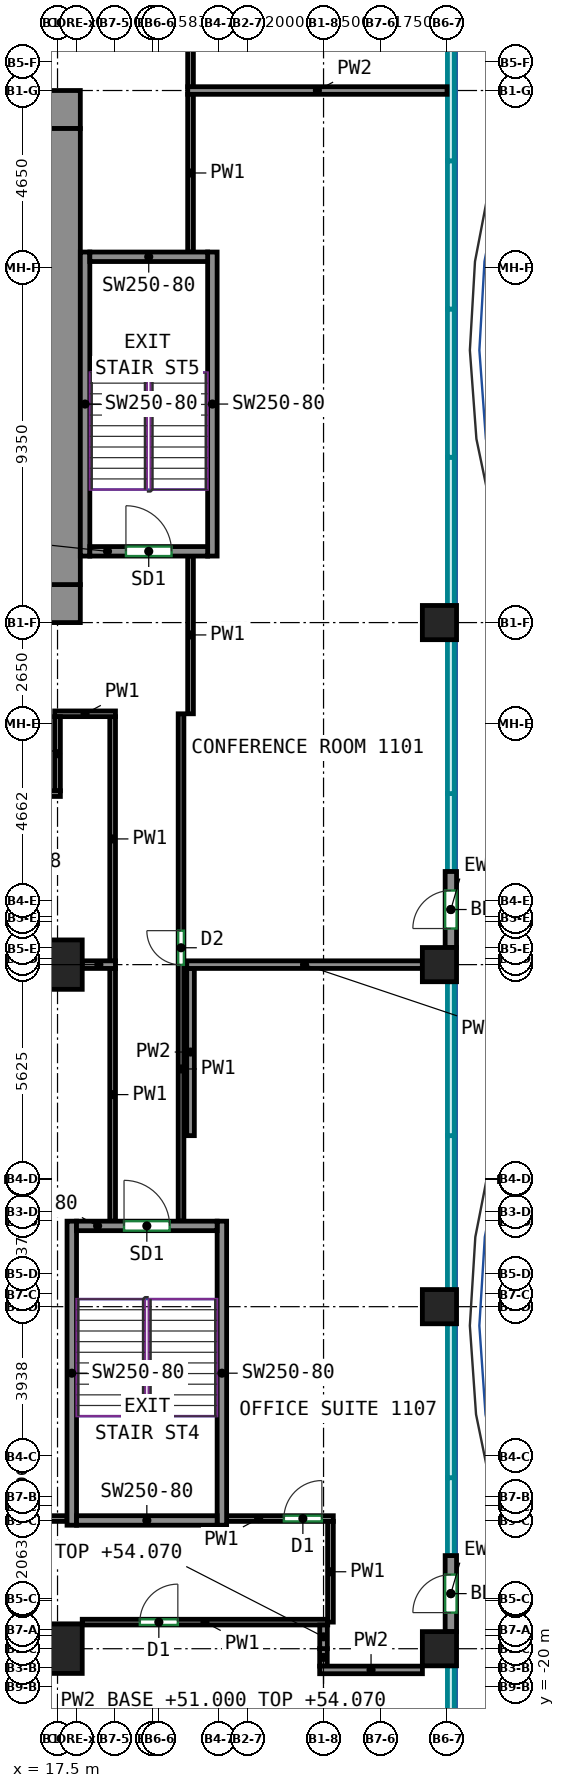
"""IFC4 building model, lengths in metres.
Left out: names, types, materials, properties, quantities, classifications, styles, units other than length and angle.
Written with IfcOpenShell. Run it as: python <this file> out.ifc"""

import sys

from ifc_helpers import new_model, si_unit, direction, frame, frame_2d, origin, origin_2d, place, context, subcontext, project, spatial, rectangle, extrude, source, transform, mapped, element, fill, save


model = new_model("IFC4")
c1 = context("Model", 3, precision=1e-05, world=origin(), true_north=direction((0.0, 1.0)))
c2 = subcontext(c1, "Body", "Model", "MODEL_VIEW")
j1 = project(units=[si_unit("LENGTHUNIT", "METRE"), si_unit("PLANEANGLEUNIT", "RADIAN")], contexts=[c1])
p1 = place(None, origin())
s1 = spatial("IfcSite", under=j1, at=p1, CompositionType="ELEMENT")
p2 = place(p1, origin())
s2 = spatial("IfcBuilding", under=s1, at=p2, CompositionType="ELEMENT")
p3 = place(p2, frame((0.0, 0.0, 51.0)))
s3 = spatial("IfcBuildingStorey", under=s2, at=p3, CompositionType="ELEMENT", Elevation=51.0)
m1 = source(origin(), c2, "Body", "SweptSolid", [
    extrude(rectangle(XDim=1.3, YDim=1.3, at=origin_2d()), origin(), (0.0, 0.0, 1.0), 3.72),
])
for number, where, z_axis, x_axis in (
    (1, (17.5, -19.0, 0.0), (0.0, 0.0, 1.0), (1.0, 0.0, 0.0)),
    (2, (17.5, -1.0, 0.0), (0.0, 0.0, 1.0), (1.0, 0.0, 0.0)),
):
    element("IfcColumn", number, at=place(p3, frame(where, z_axis=z_axis, x_axis=x_axis)), inside=s3, PredefinedType="COLUMN", context=c2, shape_type="MappedRepresentation", body=[
        mapped(m1, transform((0.0, 0.0, 0.0))),
    ])
m2 = source(origin(), c2, "Body", "SweptSolid", [
    extrude(rectangle(XDim=0.9, YDim=0.9, at=origin_2d()), origin(), (0.0, 0.0, 1.0), 3.72),
])
for number, where, z_axis, x_axis in (
    (3, (27.55, -19.0, 0.0), (0.0, 0.0, 1.0), (1.0, 0.0, 0.0)),
    (4, (27.55, -10.0, 0.0), (0.0, 0.0, 1.0), (1.0, 0.0, 0.0)),
    (5, (27.55, -1.0, 0.0), (0.0, 0.0, 1.0), (1.0, 0.0, 0.0)),
    (6, (27.55, 8.0, 0.0), (0.0, 0.0, 1.0), (1.0, 0.0, 0.0)),
):
    element("IfcColumn", number, at=place(p3, frame(where, z_axis=z_axis, x_axis=x_axis)), inside=s3, PredefinedType="COLUMN", context=c2, shape_type="MappedRepresentation", body=[
        mapped(m2, transform((0.0, 0.0, 0.0))),
    ])
m3 = source(origin(), c2, "Body", "SweptSolid", [
    extrude(rectangle(XDim=5.63, YDim=1.0, at=frame_2d((2.815, 0.0))), origin(), (0.0, 0.0, 1.0), 3.72),
])
p4 = place(p3, frame((12.47, 8.5, 0.0), z_axis=(0.0, 0.0, 1.0), x_axis=(1.0, 0.0, 0.0)))
e7 = element("IfcWall", 7, at=p4, inside=s3, PredefinedType="SHEAR", context=c2, shape_type="MappedRepresentation", body=[
    mapped(m3, transform((0.0, 0.0, 0.0))),
])
p5 = place(p4, frame((2.18, 0.0, 0.0)))
e8 = element("IfcOpeningElement", 8, at=p5, cuts=e7, PredefinedType="OPENING", context=c2, shape_type="SweptSolid", body=[
    extrude(rectangle(XDim=1.2, YDim=2.1, at=frame_2d((0.6, 1.05))), frame((0.0, 0.51, 0.0), z_axis=(0.0, -1.0, 0.0), x_axis=(1.0, 0.0, 0.0)), (0.0, 0.0, 1.0), 1.02),
])
m4 = source(origin(), c2, "Body", "SweptSolid", [
    extrude(rectangle(XDim=34.1, YDim=1.0, at=frame_2d((17.05, 0.0))), origin(), (0.0, 0.0, 1.0), 3.72),
])
p6 = place(p3, frame((-16.0, 21.5, 0.0), z_axis=(0.0, 0.0, 1.0), x_axis=(1.0, 0.0, 0.0)))
e9 = element("IfcWall", 9, at=p6, inside=s3, PredefinedType="SHEAR", context=c2, shape_type="MappedRepresentation", body=[
    mapped(m4, transform((0.0, 0.0, 0.0))),
])
p7 = place(p6, frame((6.108, 0.0, 0.0)))
e10 = element("IfcOpeningElement", 10, at=p7, cuts=e9, PredefinedType="OPENING", context=c2, shape_type="SweptSolid", body=[
    extrude(rectangle(XDim=0.9, YDim=2.1, at=frame_2d((0.45, 1.05))), frame((0.0, 0.51, 0.0), z_axis=(0.0, -1.0, 0.0), x_axis=(1.0, 0.0, 0.0)), (0.0, 0.0, 1.0), 1.02),
])
p8 = place(p6, frame((11.173, 0.0, 0.0)))
e11 = element("IfcOpeningElement", 11, at=p8, cuts=e9, PredefinedType="OPENING", context=c2, shape_type="SweptSolid", body=[
    extrude(rectangle(XDim=0.9, YDim=2.1, at=frame_2d((0.45, 1.05))), frame((0.0, 0.51, 0.0), z_axis=(0.0, -1.0, 0.0), x_axis=(1.0, 0.0, 0.0)), (0.0, 0.0, 1.0), 1.02),
])
p9 = place(p6, frame((16.238, 0.0, 0.0)))
e12 = element("IfcOpeningElement", 12, at=p9, cuts=e9, PredefinedType="OPENING", context=c2, shape_type="SweptSolid", body=[
    extrude(rectangle(XDim=0.9, YDim=2.1, at=frame_2d((0.45, 1.05))), frame((0.0, 0.51, 0.0), z_axis=(0.0, -1.0, 0.0), x_axis=(1.0, 0.0, 0.0)), (0.0, 0.0, 1.0), 1.02),
])
p10 = place(p6, frame((21.062, 0.0, 0.0)))
e13 = element("IfcOpeningElement", 13, at=p10, cuts=e9, PredefinedType="OPENING", context=c2, shape_type="SweptSolid", body=[
    extrude(rectangle(XDim=0.9, YDim=2.1, at=frame_2d((0.45, 1.05))), frame((0.0, 0.51, 0.0), z_axis=(0.0, -1.0, 0.0), x_axis=(1.0, 0.0, 0.0)), (0.0, 0.0, 1.0), 1.02),
])
p11 = place(p6, frame((26.489, 0.0, 0.0)))
e14 = element("IfcOpeningElement", 14, at=p11, cuts=e9, PredefinedType="OPENING", context=c2, shape_type="SweptSolid", body=[
    extrude(rectangle(XDim=0.9, YDim=2.1, at=frame_2d((0.45, 1.05))), frame((0.0, 0.51, 0.0), z_axis=(0.0, -1.0, 0.0), x_axis=(1.0, 0.0, 0.0)), (0.0, 0.0, 1.0), 1.02),
])
p12 = place(p6, frame((2.525, 0.0, 0.0)))
e15 = element("IfcOpeningElement", 15, at=p12, cuts=e9, PredefinedType="OPENING", context=c2, shape_type="SweptSolid", body=[
    extrude(rectangle(XDim=0.9, YDim=2.1, at=frame_2d((0.45, 1.05))), frame((0.0, 0.51, 0.0), z_axis=(0.0, -1.0, 0.0), x_axis=(1.0, 0.0, 0.0)), (0.0, 0.0, 1.0), 1.02),
])
p13 = place(p6, frame((30.675, 0.0, 0.0)))
e16 = element("IfcOpeningElement", 16, at=p13, cuts=e9, PredefinedType="OPENING", context=c2, shape_type="SweptSolid", body=[
    extrude(rectangle(XDim=0.9, YDim=2.1, at=frame_2d((0.45, 1.05))), frame((0.0, 0.51, 0.0), z_axis=(0.0, -1.0, 0.0), x_axis=(1.0, 0.0, 0.0)), (0.0, 0.0, 1.0), 1.02),
])
m5 = source(origin(), c2, "Body", "SweptSolid", [
    extrude(rectangle(XDim=12.0, YDim=1.0, at=frame_2d((6.0, 0.0))), origin(), (0.0, 0.0, 1.0), 3.72),
])
p14 = place(p3, frame((17.6, 9.0, 0.0), z_axis=(0.0, 0.0, 1.0), x_axis=(0.0, 1.0, 0.0)))
e17 = element("IfcWall", 17, at=p14, inside=s3, PredefinedType="SHEAR", context=c2, shape_type="MappedRepresentation", body=[
    mapped(m5, transform((0.0, 0.0, 0.0))),
])
m6 = source(origin(), c2, "Body", "SweptSolid", [
    extrude(rectangle(XDim=8.0, YDim=0.25, at=frame_2d((4.0, 0.0))), origin(), (0.0, 0.0, 1.0), 3.72),
])
for number, where, z_axis, x_axis in (
    (18, (17.875, -15.75, 0.0), (0.0, 0.0, 1.0), (0.0, 1.0, 0.0)),
    (19, (21.825, -15.75, 0.0), (0.0, 0.0, 1.0), (0.0, 1.0, 0.0)),
):
    element("IfcWall", number, at=place(p3, frame(where, z_axis=z_axis, x_axis=x_axis)), inside=s3, PredefinedType="SHEAR", context=c2, shape_type="MappedRepresentation", body=[
        mapped(m6, transform((0.0, 0.0, 0.0))),
    ])
m7 = source(origin(), c2, "Body", "SweptSolid", [
    extrude(rectangle(XDim=3.7, YDim=0.25, at=frame_2d((1.85, 0.0))), origin(), (0.0, 0.0, 1.0), 3.72),
])
p15 = place(p3, frame((18.0, -15.625, 0.0), z_axis=(0.0, 0.0, 1.0), x_axis=(1.0, 0.0, 0.0)))
e20 = element("IfcWall", 20, at=p15, inside=s3, PredefinedType="SHEAR", context=c2, shape_type="MappedRepresentation", body=[
    mapped(m7, transform((0.0, 0.0, 0.0))),
])
p16 = place(p3, frame((18.0, -7.875, 0.0), z_axis=(0.0, 0.0, 1.0), x_axis=(1.0, 0.0, 0.0)))
e21 = element("IfcWall", 21, at=p16, inside=s3, PredefinedType="SHEAR", context=c2, shape_type="MappedRepresentation", body=[
    mapped(m7, transform((0.0, 0.0, 0.0))),
])
p17 = place(p16, frame((1.25, 0.0, 0.0)))
e22 = element("IfcOpeningElement", 22, at=p17, cuts=e21, PredefinedType="OPENING", context=c2, shape_type="SweptSolid", body=[
    extrude(rectangle(XDim=1.2, YDim=2.1, at=frame_2d((0.6, 1.05))), frame((0.0, 0.135, 0.0), z_axis=(0.0, -1.0, 0.0), x_axis=(1.0, 0.0, 0.0)), (0.0, 0.0, 1.0), 0.27),
])
for number, where, z_axis, x_axis in (
    (23, (18.225, 9.75, 0.0), (0.0, 0.0, 1.0), (0.0, 1.0, 0.0)),
    (24, (21.575, 9.75, 0.0), (0.0, 0.0, 1.0), (0.0, 1.0, 0.0)),
):
    element("IfcWall", number, at=place(p3, frame(where, z_axis=z_axis, x_axis=x_axis)), inside=s3, PredefinedType="SHEAR", context=c2, shape_type="MappedRepresentation", body=[
        mapped(m6, transform((0.0, 0.0, 0.0))),
    ])
m8 = source(origin(), c2, "Body", "SweptSolid", [
    extrude(rectangle(XDim=3.1, YDim=0.25, at=frame_2d((1.55, 0.0))), origin(), (0.0, 0.0, 1.0), 3.72),
])
p18 = place(p3, frame((18.35, 9.875, 0.0), z_axis=(0.0, 0.0, 1.0), x_axis=(1.0, 0.0, 0.0)))
e25 = element("IfcWall", 25, at=p18, inside=s3, PredefinedType="SHEAR", context=c2, shape_type="MappedRepresentation", body=[
    mapped(m8, transform((0.0, 0.0, 0.0))),
])
p19 = place(p18, frame((0.95, 0.0, 0.0)))
e26 = element("IfcOpeningElement", 26, at=p19, cuts=e25, PredefinedType="OPENING", context=c2, shape_type="SweptSolid", body=[
    extrude(rectangle(XDim=1.2, YDim=2.1, at=frame_2d((0.6, 1.05))), frame((0.0, 0.135, 0.0), z_axis=(0.0, -1.0, 0.0), x_axis=(1.0, 0.0, 0.0)), (0.0, 0.0, 1.0), 0.27),
])
p20 = place(p3, frame((18.35, 17.625, 0.0), z_axis=(0.0, 0.0, 1.0), x_axis=(1.0, 0.0, 0.0)))
e27 = element("IfcWall", 27, at=p20, inside=s3, PredefinedType="SHEAR", context=c2, shape_type="MappedRepresentation", body=[
    mapped(m8, transform((0.0, 0.0, 0.0))),
])
m9 = source(origin(), c2, "Body", "SweptSolid", [
    extrude(rectangle(XDim=2.0, YDim=0.3, at=frame_2d((1.0, 0.0))), origin(), (0.0, 0.0, 1.0), 3.72),
])
p21 = place(p3, frame((27.85, -18.55, 0.0), z_axis=(0.0, 0.0, 1.0), x_axis=(0.0, 1.0, 0.0)))
e28 = element("IfcWall", 28, at=p21, inside=s3, PredefinedType="SOLIDWALL", context=c2, shape_type="MappedRepresentation", body=[
    mapped(m9, transform((0.0, 0.0, 0.0))),
])
p22 = place(p21, frame((0.5, 0.0, 0.0)))
e29 = element("IfcOpeningElement", 29, at=p22, cuts=e28, PredefinedType="OPENING", context=c2, shape_type="SweptSolid", body=[
    extrude(rectangle(XDim=1.0, YDim=2.1, at=frame_2d((0.5, 1.05))), frame((0.0, 0.16, 0.0), z_axis=(0.0, -1.0, 0.0), x_axis=(1.0, 0.0, 0.0)), (0.0, 0.0, 1.0), 0.32),
])
p23 = place(p3, frame((27.85, -0.55, 0.0), z_axis=(0.0, 0.0, 1.0), x_axis=(0.0, 1.0, 0.0)))
e30 = element("IfcWall", 30, at=p23, inside=s3, PredefinedType="SOLIDWALL", context=c2, shape_type="MappedRepresentation", body=[
    mapped(m9, transform((0.0, 0.0, 0.0))),
])
p24 = place(p23, frame((0.5, 0.0, 0.0)))
e31 = element("IfcOpeningElement", 31, at=p24, cuts=e30, PredefinedType="OPENING", context=c2, shape_type="SweptSolid", body=[
    extrude(rectangle(XDim=1.0, YDim=2.1, at=frame_2d((0.5, 1.05))), frame((0.0, 0.16, 0.0), z_axis=(0.0, -1.0, 0.0), x_axis=(1.0, 0.0, 0.0)), (0.0, 0.0, 1.0), 0.32),
])
p25 = place(p3, frame((18.15, -18.3, 0.0), z_axis=(0.0, 0.0, 1.0), x_axis=(1.0, 0.0, 0.0)))
e32 = element("IfcWall", 32, at=p25, inside=s3, PredefinedType="PARTITIONING", context=c2, shape_type="SweptSolid", body=[
    extrude(rectangle(XDim=6.46, YDim=0.15, at=frame_2d((3.23, 0.0))), origin(), (0.0, 0.0, 1.0), 3.72),
])
p26 = place(p25, frame((1.516, 0.0, 0.0)))
e33 = element("IfcOpeningElement", 33, at=p26, cuts=e32, PredefinedType="OPENING", context=c2, shape_type="SweptSolid", body=[
    extrude(rectangle(XDim=1.0, YDim=2.1, at=frame_2d((0.5, 1.05))), frame((0.0, 0.085, 0.0), z_axis=(0.0, -1.0, 0.0), x_axis=(1.0, 0.0, 0.0)), (0.0, 0.0, 1.0), 0.17),
])
p27 = place(p3, frame((10.825, -15.575, 0.0), z_axis=(0.0, 0.0, 1.0), x_axis=(1.0, 0.0, 0.0)))
e34 = element("IfcWall", 34, at=p27, inside=s3, PredefinedType="PARTITIONING", context=c2, shape_type="SweptSolid", body=[
    extrude(rectangle(XDim=6.925, YDim=0.15, at=frame_2d((3.462, 0.0))), origin(), (0.0, 0.0, 1.0), 3.72),
])
p28 = place(p3, frame((18.95, -7.75, 0.0), z_axis=(0.0, 0.0, 1.0), x_axis=(0.0, 1.0, 0.0)))
e35 = element("IfcWall", 35, at=p28, inside=s3, PredefinedType="PARTITIONING", context=c2, shape_type="SweptSolid", body=[
    extrude(rectangle(XDim=6.66, YDim=0.15, at=frame_2d((3.33, 0.0))), origin(), (0.0, 0.0, 1.0), 3.72),
])
p29 = place(p3, frame((21.95, -15.575, 0.0), z_axis=(0.0, 0.0, 1.0), x_axis=(1.0, 0.0, 0.0)))
e36 = element("IfcWall", 36, at=p29, inside=s3, PredefinedType="PARTITIONING", context=c2, shape_type="SweptSolid", body=[
    extrude(rectangle(XDim=2.807, YDim=0.15, at=frame_2d((1.404, 0.0))), origin(), (0.0, 0.0, 1.0), 3.72),
])
p30 = place(p29, frame((1.506, 0.0, 0.0)))
e37 = element("IfcOpeningElement", 37, at=p30, cuts=e36, PredefinedType="OPENING", context=c2, shape_type="SweptSolid", body=[
    extrude(rectangle(XDim=1.0, YDim=2.1, at=frame_2d((0.5, 1.05))), frame((0.0, 0.085, 0.0), z_axis=(0.0, -1.0, 0.0), x_axis=(1.0, 0.0, 0.0)), (0.0, 0.0, 1.0), 0.17),
])
p31 = place(p3, frame((24.682, -18.3, 0.0), z_axis=(0.0, 0.0, 1.0), x_axis=(0.0, 1.0, 0.0)))
e38 = element("IfcWall", 38, at=p31, inside=s3, PredefinedType="PARTITIONING", context=c2, shape_type="SweptSolid", body=[
    extrude(rectangle(XDim=2.65, YDim=0.15, at=frame_2d((1.325, 0.0))), origin(), (0.0, 0.0, 1.0), 3.72),
])
p32 = place(p3, frame((20.75, -7.75, 0.0), z_axis=(0.0, 0.0, 1.0), x_axis=(0.0, 1.0, 0.0)))
e39 = element("IfcWall", 39, at=p32, inside=s3, PredefinedType="PARTITIONING", context=c2, shape_type="SweptSolid", body=[
    extrude(rectangle(XDim=13.35, YDim=0.15, at=frame_2d((6.675, 0.0))), origin(), (0.0, 0.0, 1.0), 3.72),
])
p33 = place(p32, frame((6.744, 0.0, 0.0)))
e40 = element("IfcOpeningElement", 40, at=p33, cuts=e39, PredefinedType="OPENING", context=c2, shape_type="SweptSolid", body=[
    extrude(rectangle(XDim=0.9, YDim=2.1, at=frame_2d((0.45, 1.05))), frame((0.0, 0.085, 0.0), z_axis=(0.0, -1.0, 0.0), x_axis=(1.0, 0.0, 0.0)), (0.0, 0.0, 1.0), 0.17),
])
p34 = place(p3, frame((18.95, -0.91, 0.0), z_axis=(0.0, 0.0, 1.0), x_axis=(0.0, 1.0, 0.0)))
e41 = element("IfcWall", 41, at=p34, inside=s3, PredefinedType="PARTITIONING", context=c2, shape_type="SweptSolid", body=[
    extrude(rectangle(XDim=6.435, YDim=0.15, at=frame_2d((3.217, 0.0))), origin(), (0.0, 0.0, 1.0), 3.72),
])
p35 = place(p3, frame((17.425, 5.6, 0.0), z_axis=(0.0, 0.0, 1.0), x_axis=(1.0, 0.0, 0.0)))
e42 = element("IfcWall", 42, at=p35, inside=s3, PredefinedType="PARTITIONING", context=c2, shape_type="SweptSolid", body=[
    extrude(rectangle(XDim=1.6, YDim=0.15, at=frame_2d((0.8, 0.0))), origin(), (0.0, 0.0, 1.0), 3.72),
])
p36 = place(p3, frame((17.5, 3.575, 0.0), z_axis=(0.0, 0.0, 1.0), x_axis=(0.0, 1.0, 0.0)))
e43 = element("IfcWall", 43, at=p36, inside=s3, PredefinedType="PARTITIONING", context=c2, shape_type="SweptSolid", body=[
    extrude(rectangle(XDim=1.95, YDim=0.15, at=frame_2d((0.975, 0.0))), origin(), (0.0, 0.0, 1.0), 3.72),
])
p37 = place(p3, frame((10.425, 3.5, 0.0), z_axis=(0.0, 0.0, 1.0), x_axis=(1.0, 0.0, 0.0)))
e44 = element("IfcWall", 44, at=p37, inside=s3, PredefinedType="PARTITIONING", context=c2, shape_type="SweptSolid", body=[
    extrude(rectangle(XDim=7.15, YDim=0.15, at=frame_2d((3.575, 0.0))), origin(), (0.0, 0.0, 1.0), 3.72),
])
p38 = place(p37, frame((5.849, 0.0, 0.0)))
e45 = element("IfcOpeningElement", 45, at=p38, cuts=e44, PredefinedType="OPENING", context=c2, shape_type="SweptSolid", body=[
    extrude(rectangle(XDim=1.0, YDim=2.1, at=frame_2d((0.5, 1.05))), frame((0.0, 0.085, 0.0), z_axis=(0.0, -1.0, 0.0), x_axis=(1.0, 0.0, 0.0)), (0.0, 0.0, 1.0), 0.17),
])
p39 = place(p3, frame((21.0, 17.75, 0.0), z_axis=(0.0, 0.0, 1.0), x_axis=(0.0, 1.0, 0.0)))
e46 = element("IfcWall", 46, at=p39, inside=s3, PredefinedType="PARTITIONING", context=c2, shape_type="SweptSolid", body=[
    extrude(rectangle(XDim=4.16, YDim=0.15, at=frame_2d((2.08, 0.0))), origin(), (0.0, 0.0, 1.0), 3.72),
])
p40 = place(p3, frame((21.0, 5.6, 0.0), z_axis=(0.0, 0.0, 1.0), x_axis=(0.0, 1.0, 0.0)))
e47 = element("IfcWall", 47, at=p40, inside=s3, PredefinedType="PARTITIONING", context=c2, shape_type="SweptSolid", body=[
    extrude(rectangle(XDim=4.15, YDim=0.15, at=frame_2d((2.075, 0.0))), origin(), (0.0, 0.0, 1.0), 3.72),
])
p41 = place(p3, frame((21.0, 22.09, 0.0), z_axis=(0.0, 0.0, 1.0), x_axis=(0.0, 1.0, 0.0)))
e48 = element("IfcWall", 48, at=p41, inside=s3, PredefinedType="PARTITIONING", context=c2, shape_type="SweptSolid", body=[
    extrude(rectangle(XDim=2.335, YDim=0.15, at=frame_2d((1.167, 0.0))), origin(), (0.0, 0.0, 1.0), 3.72),
])
p42 = place(p3, frame((24.498, -19.458, 0.0), z_axis=(0.0, 0.0, 1.0), x_axis=(0.0, 1.0, 0.0)))
e49 = element("IfcWall", 49, at=p42, inside=s3, PredefinedType="PARTITIONING", context=c2, shape_type="SweptSolid", body=[
    extrude(rectangle(XDim=0.46, YDim=0.2, at=frame_2d((0.23, 0.0))), origin(), (0.0, 0.0, 1.0), 3.07),
])
p43 = place(p3, frame((27.102, -19.558, 0.0), z_axis=(0.0, 0.0, 1.0), x_axis=(-1.0, 0.0, 0.0)))
e50 = element("IfcWall", 50, at=p43, inside=s3, PredefinedType="PARTITIONING", context=c2, shape_type="SweptSolid", body=[
    extrude(rectangle(XDim=2.704, YDim=0.2, at=frame_2d((1.352, 0.0))), origin(), (0.0, 0.0, 1.0), 3.72),
])
p44 = place(p3, frame((24.5, -18.998, 0.0), z_axis=(0.0, 0.0, 1.0), x_axis=(0.0, 1.0, 0.0)))
e51 = element("IfcWall", 51, at=p44, inside=s3, PredefinedType="PARTITIONING", context=c2, shape_type="SweptSolid", body=[
    extrude(rectangle(XDim=0.622, YDim=0.2, at=frame_2d((0.311, 0.0))), origin(), (0.0, 0.0, 1.0), 3.07),
])
p45 = place(p3, frame((18.15, -1.0, 0.0), z_axis=(0.0, 0.0, 1.0), x_axis=(1.0, 0.0, 0.0)))
e52 = element("IfcWall", 52, at=p45, inside=s3, PredefinedType="PARTITIONING", context=c2, shape_type="SweptSolid", body=[
    extrude(rectangle(XDim=0.874, YDim=0.2, at=frame_2d((0.437, 0.0))), origin(), (0.0, 0.0, 1.0), 3.07),
])
p46 = place(p3, frame((21.0, -1.1, 0.0), z_axis=(0.0, 0.0, 1.0), x_axis=(0.0, -1.0, 0.0)))
e53 = element("IfcWall", 53, at=p46, inside=s3, PredefinedType="PARTITIONING", context=c2, shape_type="SweptSolid", body=[
    extrude(rectangle(XDim=4.4, YDim=0.2, at=frame_2d((2.2, 0.0))), origin(), (0.0, 0.0, 1.0), 3.72),
])
p47 = place(p3, frame((20.9, -1.0, 0.0), z_axis=(0.0, 0.0, 1.0), x_axis=(1.0, 0.0, 0.0)))
e54 = element("IfcWall", 54, at=p47, inside=s3, PredefinedType="PARTITIONING", context=c2, shape_type="SweptSolid", body=[
    extrude(rectangle(XDim=6.2, YDim=0.2, at=frame_2d((3.1, 0.0))), origin(), (0.0, 0.0, 1.0), 3.07),
])
p48 = place(p3, frame((27.75, 22.0, 0.0), z_axis=(0.0, 0.0, 1.0), x_axis=(-1.0, 0.0, 0.0)))
e55 = element("IfcWall", 55, at=p48, inside=s3, PredefinedType="PARTITIONING", context=c2, shape_type="SweptSolid", body=[
    extrude(rectangle(XDim=6.824, YDim=0.2, at=frame_2d((3.412, 0.0))), origin(), (0.0, 0.0, 1.0), 3.72),
])
p49 = place(p22, origin())
e56 = element("IfcDoor", 56, at=p49, inside=s3, OperationType="SINGLE_SWING_LEFT", PredefinedType="DOOR", context=c2, shape_type="SweptSolid", body=[
    extrude(rectangle(XDim=1.0, YDim=2.1, at=frame_2d((0.5, 1.05))), frame((0.0, 0.025, 0.0), z_axis=(0.0, -1.0, 0.0), x_axis=(1.0, 0.0, 0.0)), (0.0, 0.0, 1.0), 0.05),
])
fill(e29, e56)
p50 = place(p24, origin())
e57 = element("IfcDoor", 57, at=p50, inside=s3, OperationType="SINGLE_SWING_LEFT", PredefinedType="DOOR", context=c2, shape_type="SweptSolid", body=[
    extrude(rectangle(XDim=1.0, YDim=2.1, at=frame_2d((0.5, 1.05))), frame((0.0, 0.025, 0.0), z_axis=(0.0, -1.0, 0.0), x_axis=(1.0, 0.0, 0.0)), (0.0, 0.0, 1.0), 0.05),
])
fill(e31, e57)
p51 = place(p17, origin())
e58 = element("IfcDoor", 58, at=p51, inside=s3, OperationType="DOUBLE_DOOR_SINGLE_SWING", PredefinedType="DOOR", context=c2, shape_type="SweptSolid", body=[
    extrude(rectangle(XDim=1.2, YDim=2.1, at=frame_2d((0.6, 1.05))), frame((0.0, 0.025, 0.0), z_axis=(0.0, -1.0, 0.0), x_axis=(1.0, 0.0, 0.0)), (0.0, 0.0, 1.0), 0.05),
])
fill(e22, e58)
p52 = place(p19, origin())
e59 = element("IfcDoor", 59, at=p52, inside=s3, OperationType="DOUBLE_DOOR_SINGLE_SWING", PredefinedType="DOOR", context=c2, shape_type="SweptSolid", body=[
    extrude(rectangle(XDim=1.2, YDim=2.1, at=frame_2d((0.6, 1.05))), frame((0.0, 0.025, 0.0), z_axis=(0.0, -1.0, 0.0), x_axis=(1.0, 0.0, 0.0)), (0.0, 0.0, 1.0), 0.05),
])
fill(e26, e59)
p53 = place(p26, origin())
e60 = element("IfcDoor", 60, at=p53, inside=s3, OperationType="SINGLE_SWING_RIGHT", PredefinedType="DOOR", context=c2, shape_type="SweptSolid", body=[
    extrude(rectangle(XDim=1.0, YDim=2.1, at=frame_2d((0.5, 1.05))), frame((0.0, 0.025, 0.0), z_axis=(0.0, -1.0, 0.0), x_axis=(1.0, 0.0, 0.0)), (0.0, 0.0, 1.0), 0.05),
])
fill(e33, e60)
p54 = place(p30, origin())
e61 = element("IfcDoor", 61, at=p54, inside=s3, OperationType="SINGLE_SWING_RIGHT", PredefinedType="DOOR", context=c2, shape_type="SweptSolid", body=[
    extrude(rectangle(XDim=1.0, YDim=2.1, at=frame_2d((0.5, 1.05))), frame((0.0, 0.025, 0.0), z_axis=(0.0, -1.0, 0.0), x_axis=(1.0, 0.0, 0.0)), (0.0, 0.0, 1.0), 0.05),
])
fill(e37, e61)
p55 = place(p33, origin())
e62 = element("IfcDoor", 62, at=p55, inside=s3, OperationType="SINGLE_SWING_RIGHT", PredefinedType="DOOR", context=c2, shape_type="SweptSolid", body=[
    extrude(rectangle(XDim=0.9, YDim=2.1, at=frame_2d((0.45, 1.05))), frame((0.0, 0.025, 0.0), z_axis=(0.0, -1.0, 0.0), x_axis=(1.0, 0.0, 0.0)), (0.0, 0.0, 1.0), 0.05),
])
fill(e40, e62)
save(model, sys.argv[1])
